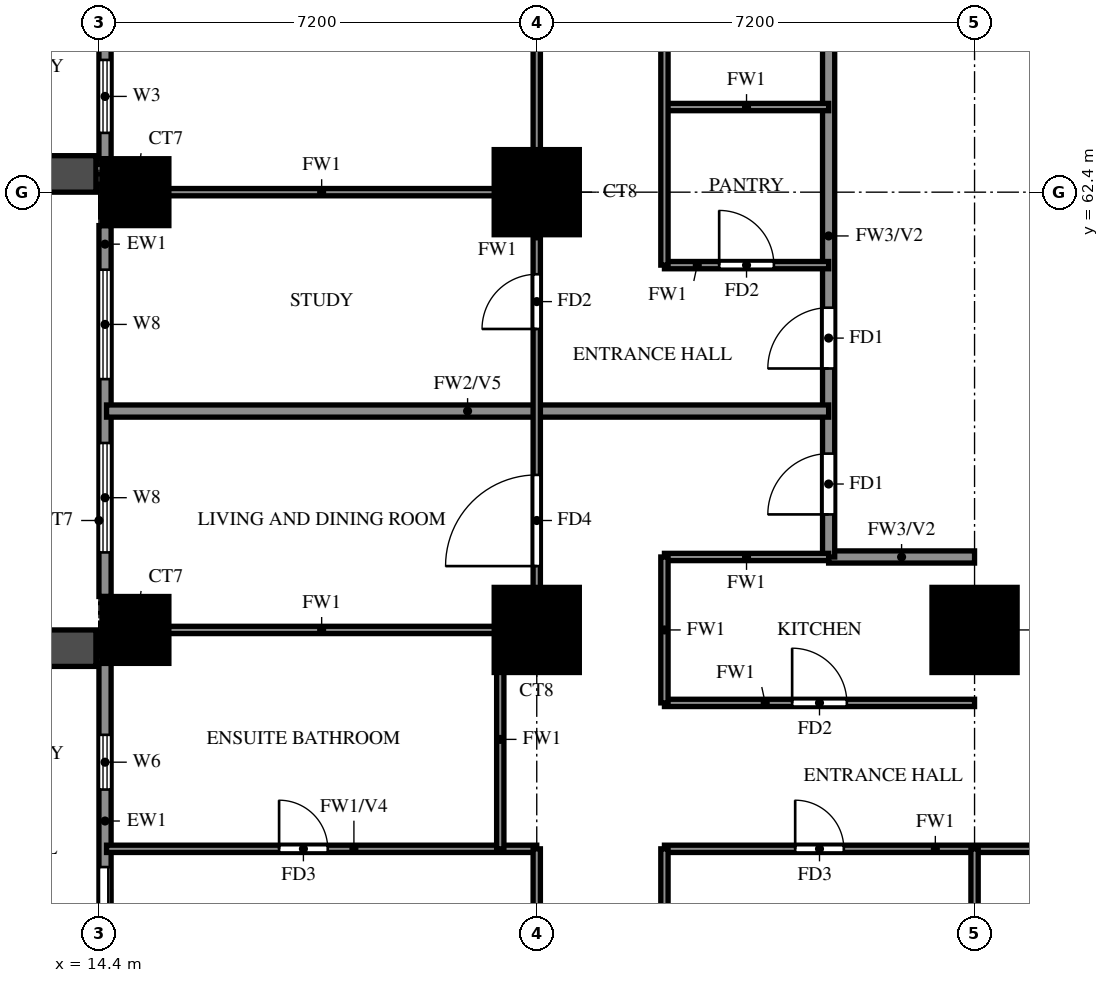
"""IFC4 building model, lengths in metres.
Left out: names, types, materials, properties, quantities, classifications, styles, units other than length and angle.
Written with IfcOpenShell. Run it as: python <this file> out.ifc"""

import sys

from ifc_helpers import new_model, si_unit, direction, frame, frame_2d, origin, origin_2d, place, context, subcontext, project, spatial, rectangle, extrude, source, transform, mapped, element, fill, save


model = new_model("IFC4")
c1 = context("Model", 3, precision=1e-05, world=origin(), true_north=direction((0.0, 1.0)))
c2 = subcontext(c1, "Body", "Model", "MODEL_VIEW")
j1 = project(units=[si_unit("LENGTHUNIT", "METRE"), si_unit("PLANEANGLEUNIT", "RADIAN")], contexts=[c1])
p1 = place(None, origin())
s1 = spatial("IfcSite", under=j1, at=p1, CompositionType="ELEMENT")
p2 = place(p1, origin())
s2 = spatial("IfcBuilding", under=s1, at=p2, CompositionType="ELEMENT")
p3 = place(p2, frame((0.0, 0.0, 58.5)))
s3 = spatial("IfcBuildingStorey", under=s2, at=p3, CompositionType="ELEMENT", Elevation=58.5)
m1 = source(origin(), c2, "Body", "SweptSolid", [
    extrude(rectangle(XDim=1.1, YDim=1.1, at=origin_2d()), origin(), (0.0, 0.0, 1.0), 3.18),
])
p4 = place(p3, frame((15.0, 55.2, 0.0), z_axis=(0.0, 0.0, 1.0), x_axis=(1.0, 0.0, 0.0)))
e1 = element("IfcColumn", 1, at=p4, inside=s3, PredefinedType="COLUMN", context=c2, shape_type="MappedRepresentation", body=[
    mapped(m1, transform((0.0, 0.0, 0.0))),
])
m2 = source(origin(), c2, "Body", "SweptSolid", [
    extrude(rectangle(XDim=1.4, YDim=1.4, at=origin_2d()), origin(), (0.0, 0.0, 1.0), 3.18),
])
for number, where, z_axis, x_axis in (
    (2, (21.6, 55.2, 0.0), (0.0, 0.0, 1.0), (1.0, 0.0, 0.0)),
    (3, (28.8, 55.2, 0.0), (0.0, 0.0, 1.0), (1.0, 0.0, 0.0)),
):
    element("IfcColumn", number, at=place(p3, frame(where, z_axis=z_axis, x_axis=x_axis)), inside=s3, PredefinedType="COLUMN", context=c2, shape_type="MappedRepresentation", body=[
        mapped(m2, transform((0.0, 0.0, 0.0))),
    ])
p5 = place(p3, frame((15.0, 62.4, 0.0), z_axis=(0.0, 0.0, 1.0), x_axis=(1.0, 0.0, 0.0)))
e4 = element("IfcColumn", 4, at=p5, inside=s3, PredefinedType="COLUMN", context=c2, shape_type="MappedRepresentation", body=[
    mapped(m1, transform((0.0, 0.0, 0.0))),
])
p6 = place(p3, frame((21.6, 62.4, 0.0), z_axis=(0.0, 0.0, 1.0), x_axis=(1.0, 0.0, 0.0)))
e5 = element("IfcColumn", 5, at=p6, inside=s3, PredefinedType="COLUMN", context=c2, shape_type="MappedRepresentation", body=[
    mapped(m2, transform((0.0, 0.0, 0.0))),
])
p7 = place(p3, frame((14.5, 69.05, 0.0), z_axis=(0.0, 0.0, 1.0), x_axis=(0.0, -1.0, 0.0)))
e6 = element("IfcWall", 6, at=p7, inside=s3, PredefinedType="SOLIDWALL", context=c2, shape_type="SweptSolid", body=[
    extrude(rectangle(XDim=6.1, YDim=0.2, at=frame_2d((3.05, 0.0))), origin(), (0.0, 0.0, 1.0), 3.18),
])
p8 = place(p7, frame((2.15, 0.0, 0.0)))
e7 = element("IfcOpeningElement", 7, at=p8, cuts=e6, PredefinedType="OPENING", context=c2, shape_type="SweptSolid", body=[
    extrude(rectangle(XDim=1.8, YDim=2.4, at=frame_2d((0.9, 1.2))), frame((0.0, 0.11, 0.0), z_axis=(0.0, -1.0, 0.0), x_axis=(1.0, 0.0, 0.0)), (0.0, 0.0, 1.0), 0.22),
])
p9 = place(p7, frame((0.425, 0.0, 0.6)))
e8 = element("IfcOpeningElement", 8, at=p9, cuts=e6, PredefinedType="OPENING", context=c2, shape_type="SweptSolid", body=[
    extrude(rectangle(XDim=1.2, YDim=2.4, at=frame_2d((0.6, 1.2))), frame((0.0, 0.11, 0.0), z_axis=(0.0, -1.0, 0.0), x_axis=(1.0, 0.0, 0.0)), (0.0, 0.0, 1.0), 0.22),
])
p10 = place(p7, frame((4.475, 0.0, 0.6)))
e9 = element("IfcOpeningElement", 9, at=p10, cuts=e6, PredefinedType="OPENING", context=c2, shape_type="SweptSolid", body=[
    extrude(rectangle(XDim=1.2, YDim=2.4, at=frame_2d((0.6, 1.2))), frame((0.0, 0.11, 0.0), z_axis=(0.0, -1.0, 0.0), x_axis=(1.0, 0.0, 0.0)), (0.0, 0.0, 1.0), 0.22),
])
p11 = place(p3, frame((14.5, 61.85, 0.0), z_axis=(0.0, 0.0, 1.0), x_axis=(0.0, -1.0, 0.0)))
e10 = element("IfcWall", 10, at=p11, inside=s3, PredefinedType="SOLIDWALL", context=c2, shape_type="SweptSolid", body=[
    extrude(rectangle(XDim=6.1, YDim=0.2, at=frame_2d((3.05, 0.0))), origin(), (0.0, 0.0, 1.0), 3.18),
])
p12 = place(p11, frame((3.575, 0.0, 0.6)))
e11 = element("IfcOpeningElement", 11, at=p12, cuts=e10, PredefinedType="OPENING", context=c2, shape_type="SweptSolid", body=[
    extrude(rectangle(XDim=1.8, YDim=2.4, at=frame_2d((0.9, 1.2))), frame((0.0, 0.11, 0.0), z_axis=(0.0, -1.0, 0.0), x_axis=(1.0, 0.0, 0.0)), (0.0, 0.0, 1.0), 0.22),
])
p13 = place(p11, frame((0.725, 0.0, 0.6)))
e12 = element("IfcOpeningElement", 12, at=p13, cuts=e10, PredefinedType="OPENING", context=c2, shape_type="SweptSolid", body=[
    extrude(rectangle(XDim=1.8, YDim=2.4, at=frame_2d((0.9, 1.2))), frame((0.0, 0.11, 0.0), z_axis=(0.0, -1.0, 0.0), x_axis=(1.0, 0.0, 0.0)), (0.0, 0.0, 1.0), 0.22),
])
p14 = place(p3, frame((14.5, 54.65, 0.0), z_axis=(0.0, 0.0, 1.0), x_axis=(0.0, -1.0, 0.0)))
e13 = element("IfcWall", 13, at=p14, inside=s3, PredefinedType="SOLIDWALL", context=c2, shape_type="SweptSolid", body=[
    extrude(rectangle(XDim=6.1, YDim=0.2, at=frame_2d((3.05, 0.0))), origin(), (0.0, 0.0, 1.0), 3.18),
])
p15 = place(p14, frame((3.35, 0.0, 0.0)))
e14 = element("IfcOpeningElement", 14, at=p15, cuts=e13, PredefinedType="OPENING", context=c2, shape_type="SweptSolid", body=[
    extrude(rectangle(XDim=1.8, YDim=2.4, at=frame_2d((0.9, 1.2))), frame((0.0, 0.11, 0.0), z_axis=(0.0, -1.0, 0.0), x_axis=(1.0, 0.0, 0.0)), (0.0, 0.0, 1.0), 0.22),
])
p16 = place(p14, frame((1.175, 0.0, 1.5)))
e15 = element("IfcOpeningElement", 15, at=p16, cuts=e13, PredefinedType="OPENING", context=c2, shape_type="SweptSolid", body=[
    extrude(rectangle(XDim=0.9, YDim=0.9, at=frame_2d((0.45, 0.45))), frame((0.0, 0.11, 0.0), z_axis=(0.0, -1.0, 0.0), x_axis=(1.0, 0.0, 0.0)), (0.0, 0.0, 1.0), 0.22),
])
for number, where, z_axis, x_axis in (
    (16, (14.35, 62.7, 0.0), (0.0, 0.0, 1.0), (-1.0, 0.0, 0.0)),
    (17, (14.35, 54.9, 0.0), (0.0, 0.0, 1.0), (-1.0, 0.0, 0.0)),
):
    element("IfcWall", number, at=place(p3, frame(where, z_axis=z_axis, x_axis=x_axis)), inside=s3, PredefinedType="SOLIDWALL", context=c2, shape_type="SweptSolid", body=[
        extrude(rectangle(XDim=2.65, YDim=0.6, at=frame_2d((1.325, 0.0))), origin(), (0.0, 0.0, 1.0), 2.85),
    ])
p17 = place(p3, frame((26.4, 56.4, 0.0), z_axis=(0.0, 0.0, 1.0), x_axis=(1.0, 0.0, 0.0)))
e18 = element("IfcWall", 18, at=p17, inside=s3, PredefinedType="SOLIDWALL", context=c2, shape_type="SweptSolid", body=[
    extrude(rectangle(XDim=2.4, YDim=0.2, at=frame_2d((1.2, 0.0))), origin(), (0.0, 0.0, 1.0), 3.18),
])
p18 = place(p3, frame((26.4, 56.4, 0.0), z_axis=(0.0, 0.0, 1.0), x_axis=(0.0, 1.0, 0.0)))
e19 = element("IfcWall", 19, at=p18, inside=s3, PredefinedType="SOLIDWALL", context=c2, shape_type="SweptSolid", body=[
    extrude(rectangle(XDim=9.6, YDim=0.2, at=frame_2d((4.8, 0.0))), origin(), (0.0, 0.0, 1.0), 3.18),
])
p19 = place(p18, frame((0.7, 0.0, 0.0)))
e20 = element("IfcOpeningElement", 20, at=p19, cuts=e19, PredefinedType="OPENING", context=c2, shape_type="SweptSolid", body=[
    extrude(rectangle(XDim=1.0, YDim=2.1, at=frame_2d((0.5, 1.05))), frame((0.0, 0.11, 0.0), z_axis=(0.0, -1.0, 0.0), x_axis=(1.0, 0.0, 0.0)), (0.0, 0.0, 1.0), 0.22),
])
p20 = place(p18, frame((3.1, 0.0, 0.0)))
e21 = element("IfcOpeningElement", 21, at=p20, cuts=e19, PredefinedType="OPENING", context=c2, shape_type="SweptSolid", body=[
    extrude(rectangle(XDim=1.0, YDim=2.1, at=frame_2d((0.5, 1.05))), frame((0.0, 0.11, 0.0), z_axis=(0.0, -1.0, 0.0), x_axis=(1.0, 0.0, 0.0)), (0.0, 0.0, 1.0), 0.22),
])
p21 = place(p3, frame((14.525, 58.8, 0.0), z_axis=(0.0, 0.0, 1.0), x_axis=(1.0, 0.0, 0.0)))
e22 = element("IfcWall", 22, at=p21, inside=s3, PredefinedType="SOLIDWALL", context=c2, shape_type="SweptSolid", body=[
    extrude(rectangle(XDim=11.875, YDim=0.2, at=frame_2d((5.938, 0.0))), origin(), (0.0, 0.0, 1.0), 2.28),
])
p22 = place(p3, frame((14.525, 51.6, 0.0), z_axis=(0.0, 0.0, 1.0), x_axis=(1.0, 0.0, 0.0)))
e23 = element("IfcWall", 23, at=p22, inside=s3, PredefinedType="PARTITIONING", context=c2, shape_type="SweptSolid", body=[
    extrude(rectangle(XDim=7.075, YDim=0.12, at=frame_2d((3.538, 0.0))), origin(), (0.0, 0.0, 1.0), 2.28),
])
p23 = place(p22, frame((2.837, 0.0, 0.0)))
e24 = element("IfcOpeningElement", 24, at=p23, cuts=e23, PredefinedType="OPENING", context=c2, shape_type="SweptSolid", body=[
    extrude(rectangle(XDim=0.8, YDim=2.1, at=frame_2d((0.4, 1.05))), frame((0.0, 0.07, 0.0), z_axis=(0.0, -1.0, 0.0), x_axis=(1.0, 0.0, 0.0)), (0.0, 0.0, 1.0), 0.14),
])
p24 = place(p3, frame((23.7, 51.6, 0.0), z_axis=(0.0, 0.0, 1.0), x_axis=(1.0, 0.0, 0.0)))
e25 = element("IfcWall", 25, at=p24, inside=s3, PredefinedType="PARTITIONING", context=c2, shape_type="SweptSolid", body=[
    extrude(rectangle(XDim=9.9, YDim=0.12, at=frame_2d((4.95, 0.0))), origin(), (0.0, 0.0, 1.0), 3.18),
])
p25 = place(p24, frame((2.15, 0.0, 0.0)))
e26 = element("IfcOpeningElement", 26, at=p25, cuts=e25, PredefinedType="OPENING", context=c2, shape_type="SweptSolid", body=[
    extrude(rectangle(XDim=0.8, YDim=2.1, at=frame_2d((0.4, 1.05))), frame((0.0, 0.07, 0.0), z_axis=(0.0, -1.0, 0.0), x_axis=(1.0, 0.0, 0.0)), (0.0, 0.0, 1.0), 0.14),
])
p26 = place(p24, frame((7.05, 0.0, 0.0)))
e27 = element("IfcOpeningElement", 27, at=p26, cuts=e25, PredefinedType="OPENING", context=c2, shape_type="SweptSolid", body=[
    extrude(rectangle(XDim=0.9, YDim=2.1, at=frame_2d((0.45, 1.05))), frame((0.0, 0.07, 0.0), z_axis=(0.0, -1.0, 0.0), x_axis=(1.0, 0.0, 0.0)), (0.0, 0.0, 1.0), 0.14),
])
p27 = place(p3, frame((23.7, 54.0, 0.0), z_axis=(0.0, 0.0, 1.0), x_axis=(1.0, 0.0, 0.0)))
e28 = element("IfcWall", 28, at=p27, inside=s3, PredefinedType="PARTITIONING", context=c2, shape_type="SweptSolid", body=[
    extrude(rectangle(XDim=5.1, YDim=0.12, at=frame_2d((2.55, 0.0))), origin(), (0.0, 0.0, 1.0), 3.18),
])
p28 = place(p27, frame((2.1, 0.0, 0.0)))
e29 = element("IfcOpeningElement", 29, at=p28, cuts=e28, PredefinedType="OPENING", context=c2, shape_type="SweptSolid", body=[
    extrude(rectangle(XDim=0.9, YDim=2.1, at=frame_2d((0.45, 1.05))), frame((0.0, 0.07, 0.0), z_axis=(0.0, -1.0, 0.0), x_axis=(1.0, 0.0, 0.0)), (0.0, 0.0, 1.0), 0.14),
])
p29 = place(p3, frame((14.525, 55.2, 0.0), z_axis=(0.0, 0.0, 1.0), x_axis=(1.0, 0.0, 0.0)))
e30 = element("IfcWall", 30, at=p29, inside=s3, PredefinedType="PARTITIONING", context=c2, shape_type="SweptSolid", body=[
    extrude(rectangle(XDim=7.075, YDim=0.12, at=frame_2d((3.538, 0.0))), origin(), (0.0, 0.0, 1.0), 3.18),
])
p30 = place(p3, frame((23.7, 56.4, 0.0), z_axis=(0.0, 0.0, 1.0), x_axis=(1.0, 0.0, 0.0)))
e31 = element("IfcWall", 31, at=p30, inside=s3, PredefinedType="PARTITIONING", context=c2, shape_type="SweptSolid", body=[
    extrude(rectangle(XDim=2.7, YDim=0.12, at=frame_2d((1.35, 0.0))), origin(), (0.0, 0.0, 1.0), 3.18),
])
p31 = place(p3, frame((23.7, 61.2, 0.0), z_axis=(0.0, 0.0, 1.0), x_axis=(1.0, 0.0, 0.0)))
e32 = element("IfcWall", 32, at=p31, inside=s3, PredefinedType="PARTITIONING", context=c2, shape_type="SweptSolid", body=[
    extrude(rectangle(XDim=2.7, YDim=0.12, at=frame_2d((1.35, 0.0))), origin(), (0.0, 0.0, 1.0), 3.18),
])
p32 = place(p31, frame((0.9, 0.0, 0.0)))
e33 = element("IfcOpeningElement", 33, at=p32, cuts=e32, PredefinedType="OPENING", context=c2, shape_type="SweptSolid", body=[
    extrude(rectangle(XDim=0.9, YDim=2.1, at=frame_2d((0.45, 1.05))), frame((0.0, 0.07, 0.0), z_axis=(0.0, -1.0, 0.0), x_axis=(1.0, 0.0, 0.0)), (0.0, 0.0, 1.0), 0.14),
])
p33 = place(p3, frame((14.525, 62.4, 0.0), z_axis=(0.0, 0.0, 1.0), x_axis=(1.0, 0.0, 0.0)))
e34 = element("IfcWall", 34, at=p33, inside=s3, PredefinedType="PARTITIONING", context=c2, shape_type="SweptSolid", body=[
    extrude(rectangle(XDim=7.075, YDim=0.12, at=frame_2d((3.538, 0.0))), origin(), (0.0, 0.0, 1.0), 3.18),
])
p34 = place(p3, frame((23.7, 63.8, 0.0), z_axis=(0.0, 0.0, 1.0), x_axis=(1.0, 0.0, 0.0)))
e35 = element("IfcWall", 35, at=p34, inside=s3, PredefinedType="PARTITIONING", context=c2, shape_type="SweptSolid", body=[
    extrude(rectangle(XDim=2.7, YDim=0.12, at=frame_2d((1.35, 0.0))), origin(), (0.0, 0.0, 1.0), 3.18),
])
p35 = place(p3, frame((21.0, 51.6, 0.0), z_axis=(0.0, 0.0, 1.0), x_axis=(0.0, 1.0, 0.0)))
e36 = element("IfcWall", 36, at=p35, inside=s3, PredefinedType="PARTITIONING", context=c2, shape_type="SweptSolid", body=[
    extrude(rectangle(XDim=3.6, YDim=0.12, at=frame_2d((1.8, 0.0))), origin(), (0.0, 0.0, 1.0), 3.18),
])
p36 = place(p3, frame((21.6, 33.725, 0.0), z_axis=(0.0, 0.0, 1.0), x_axis=(0.0, 1.0, 0.0)))
e37 = element("IfcWall", 37, at=p36, inside=s3, PredefinedType="PARTITIONING", context=c2, shape_type="SweptSolid", body=[
    extrude(rectangle(XDim=17.875, YDim=0.12, at=frame_2d((8.938, 0.0))), origin(), (0.0, 0.0, 1.0), 3.18),
])
p37 = place(p36, frame((7.775, 0.0, 0.0)))
e38 = element("IfcOpeningElement", 38, at=p37, cuts=e37, PredefinedType="OPENING", context=c2, shape_type="SweptSolid", body=[
    extrude(rectangle(XDim=0.9, YDim=2.1, at=frame_2d((0.45, 1.05))), frame((0.0, 0.07, 0.0), z_axis=(0.0, -1.0, 0.0), x_axis=(1.0, 0.0, 0.0)), (0.0, 0.0, 1.0), 0.14),
])
p38 = place(p36, frame((15.625, 0.0, 0.0)))
e39 = element("IfcOpeningElement", 39, at=p38, cuts=e37, PredefinedType="OPENING", context=c2, shape_type="SweptSolid", body=[
    extrude(rectangle(XDim=0.9, YDim=2.1, at=frame_2d((0.45, 1.05))), frame((0.0, 0.07, 0.0), z_axis=(0.0, -1.0, 0.0), x_axis=(1.0, 0.0, 0.0)), (0.0, 0.0, 1.0), 0.14),
])
p39 = place(p3, frame((21.6, 55.2, 0.0), z_axis=(0.0, 0.0, 1.0), x_axis=(0.0, 1.0, 0.0)))
e40 = element("IfcWall", 40, at=p39, inside=s3, PredefinedType="PARTITIONING", context=c2, shape_type="SweptSolid", body=[
    extrude(rectangle(XDim=14.4, YDim=0.12, at=frame_2d((7.2, 0.0))), origin(), (0.0, 0.0, 1.0), 3.18),
])
p40 = place(p39, frame((1.05, 0.0, 0.0)))
e41 = element("IfcOpeningElement", 41, at=p40, cuts=e40, PredefinedType="OPENING", context=c2, shape_type="SweptSolid", body=[
    extrude(rectangle(XDim=1.5, YDim=2.1, at=frame_2d((0.75, 1.05))), frame((0.0, 0.07, 0.0), z_axis=(0.0, -1.0, 0.0), x_axis=(1.0, 0.0, 0.0)), (0.0, 0.0, 1.0), 0.14),
])
p41 = place(p39, frame((4.95, 0.0, 0.0)))
e42 = element("IfcOpeningElement", 42, at=p41, cuts=e40, PredefinedType="OPENING", context=c2, shape_type="SweptSolid", body=[
    extrude(rectangle(XDim=0.9, YDim=2.1, at=frame_2d((0.45, 1.05))), frame((0.0, 0.07, 0.0), z_axis=(0.0, -1.0, 0.0), x_axis=(1.0, 0.0, 0.0)), (0.0, 0.0, 1.0), 0.14),
])
p42 = place(p39, frame((10.35, 0.0, 0.0)))
e43 = element("IfcOpeningElement", 43, at=p42, cuts=e40, PredefinedType="OPENING", context=c2, shape_type="SweptSolid", body=[
    extrude(rectangle(XDim=0.9, YDim=2.1, at=frame_2d((0.45, 1.05))), frame((0.0, 0.07, 0.0), z_axis=(0.0, -1.0, 0.0), x_axis=(1.0, 0.0, 0.0)), (0.0, 0.0, 1.0), 0.14),
])
p43 = place(p3, frame((23.7, 48.0, 0.0), z_axis=(0.0, 0.0, 1.0), x_axis=(0.0, 1.0, 0.0)))
e44 = element("IfcWall", 44, at=p43, inside=s3, PredefinedType="PARTITIONING", context=c2, shape_type="SweptSolid", body=[
    extrude(rectangle(XDim=3.6, YDim=0.12, at=frame_2d((1.8, 0.0))), origin(), (0.0, 0.0, 1.0), 3.18),
])
p44 = place(p3, frame((23.7, 54.0, 0.0), z_axis=(0.0, 0.0, 1.0), x_axis=(0.0, 1.0, 0.0)))
e45 = element("IfcWall", 45, at=p44, inside=s3, PredefinedType="PARTITIONING", context=c2, shape_type="SweptSolid", body=[
    extrude(rectangle(XDim=2.4, YDim=0.12, at=frame_2d((1.2, 0.0))), origin(), (0.0, 0.0, 1.0), 3.18),
])
p45 = place(p3, frame((23.7, 61.2, 0.0), z_axis=(0.0, 0.0, 1.0), x_axis=(0.0, 1.0, 0.0)))
e46 = element("IfcWall", 46, at=p45, inside=s3, PredefinedType="PARTITIONING", context=c2, shape_type="SweptSolid", body=[
    extrude(rectangle(XDim=12.0, YDim=0.12, at=frame_2d((6.0, 0.0))), origin(), (0.0, 0.0, 1.0), 3.18),
])
p46 = place(p45, frame((4.55, 0.0, 0.0)))
e47 = element("IfcOpeningElement", 47, at=p46, cuts=e46, PredefinedType="OPENING", context=c2, shape_type="SweptSolid", body=[
    extrude(rectangle(XDim=0.9, YDim=2.1, at=frame_2d((0.45, 1.05))), frame((0.0, 0.07, 0.0), z_axis=(0.0, -1.0, 0.0), x_axis=(1.0, 0.0, 0.0)), (0.0, 0.0, 1.0), 0.14),
])
p47 = place(p45, frame((9.3, 0.0, 0.0)))
e48 = element("IfcOpeningElement", 48, at=p47, cuts=e46, PredefinedType="OPENING", context=c2, shape_type="SweptSolid", body=[
    extrude(rectangle(XDim=0.8, YDim=2.1, at=frame_2d((0.4, 1.05))), frame((0.0, 0.07, 0.0), z_axis=(0.0, -1.0, 0.0), x_axis=(1.0, 0.0, 0.0)), (0.0, 0.0, 1.0), 0.14),
])
p48 = place(p3, frame((28.8, 48.0, 0.0), z_axis=(0.0, 0.0, 1.0), x_axis=(0.0, 1.0, 0.0)))
e49 = element("IfcWall", 49, at=p48, inside=s3, PredefinedType="PARTITIONING", context=c2, shape_type="SweptSolid", body=[
    extrude(rectangle(XDim=3.6, YDim=0.12, at=frame_2d((1.8, 0.0))), origin(), (0.0, 0.0, 1.0), 3.18),
])
p49 = place(p10, origin())
e50 = element("IfcWindow", 50, at=p49, inside=s3, PartitioningType="SINGLE_PANEL", PredefinedType="WINDOW", context=c2, shape_type="SweptSolid", body=[
    extrude(rectangle(XDim=1.2, YDim=2.4, at=frame_2d((0.6, 1.2))), frame((0.0, 0.03, 0.0), z_axis=(0.0, -1.0, 0.0), x_axis=(1.0, 0.0, 0.0)), (0.0, 0.0, 1.0), 0.06),
])
fill(e9, e50)
p50 = place(p12, origin())
e51 = element("IfcWindow", 51, at=p50, inside=s3, PartitioningType="DOUBLE_PANEL_VERTICAL", PredefinedType="WINDOW", context=c2, shape_type="SweptSolid", body=[
    extrude(rectangle(XDim=1.8, YDim=2.4, at=frame_2d((0.9, 1.2))), frame((0.0, 0.03, 0.0), z_axis=(0.0, -1.0, 0.0), x_axis=(1.0, 0.0, 0.0)), (0.0, 0.0, 1.0), 0.06),
])
fill(e11, e51)
p51 = place(p13, origin())
e52 = element("IfcWindow", 52, at=p51, inside=s3, PartitioningType="DOUBLE_PANEL_VERTICAL", PredefinedType="WINDOW", context=c2, shape_type="SweptSolid", body=[
    extrude(rectangle(XDim=1.8, YDim=2.4, at=frame_2d((0.9, 1.2))), frame((0.0, 0.03, 0.0), z_axis=(0.0, -1.0, 0.0), x_axis=(1.0, 0.0, 0.0)), (0.0, 0.0, 1.0), 0.06),
])
fill(e12, e52)
p52 = place(p15, origin())
e53 = element("IfcDoor", 53, at=p52, inside=s3, OperationType="DOUBLE_DOOR_SLIDING", PredefinedType="DOOR", context=c2, shape_type="SweptSolid", body=[
    extrude(rectangle(XDim=1.8, YDim=2.4, at=frame_2d((0.9, 1.2))), frame((0.0, 0.025, 0.0), z_axis=(0.0, -1.0, 0.0), x_axis=(1.0, 0.0, 0.0)), (0.0, 0.0, 1.0), 0.05),
])
fill(e14, e53)
p53 = place(p16, origin())
e54 = element("IfcWindow", 54, at=p53, inside=s3, PartitioningType="SINGLE_PANEL", PredefinedType="WINDOW", context=c2, shape_type="SweptSolid", body=[
    extrude(rectangle(XDim=0.9, YDim=0.9, at=frame_2d((0.45, 0.45))), frame((0.0, 0.03, 0.0), z_axis=(0.0, -1.0, 0.0), x_axis=(1.0, 0.0, 0.0)), (0.0, 0.0, 1.0), 0.06),
])
fill(e15, e54)
p54 = place(p19, origin())
e55 = element("IfcDoor", 55, at=p54, inside=s3, OperationType="SINGLE_SWING_RIGHT", PredefinedType="DOOR", context=c2, shape_type="SweptSolid", body=[
    extrude(rectangle(XDim=1.0, YDim=2.1, at=frame_2d((0.5, 1.05))), frame((0.0, 0.025, 0.0), z_axis=(0.0, -1.0, 0.0), x_axis=(1.0, 0.0, 0.0)), (0.0, 0.0, 1.0), 0.05),
])
fill(e20, e55)
p55 = place(p23, origin())
e56 = element("IfcDoor", 56, at=p55, inside=s3, OperationType="SINGLE_SWING_LEFT", PredefinedType="DOOR", context=c2, shape_type="SweptSolid", body=[
    extrude(rectangle(XDim=0.8, YDim=2.1, at=frame_2d((0.4, 1.05))), frame((0.0, 0.025, 0.0), z_axis=(0.0, -1.0, 0.0), x_axis=(1.0, 0.0, 0.0)), (0.0, 0.0, 1.0), 0.05),
])
fill(e24, e56)
p56 = place(p40, origin())
e57 = element("IfcDoor", 57, at=p56, inside=s3, OperationType="SINGLE_SWING_RIGHT", PredefinedType="DOOR", context=c2, shape_type="SweptSolid", body=[
    extrude(rectangle(XDim=1.5, YDim=2.1, at=frame_2d((0.75, 1.05))), frame((0.0, 0.025, 0.0), z_axis=(0.0, -1.0, 0.0), x_axis=(1.0, 0.0, 0.0)), (0.0, 0.0, 1.0), 0.05),
])
fill(e41, e57)
p57 = place(p25, origin())
e58 = element("IfcDoor", 58, at=p57, inside=s3, OperationType="SINGLE_SWING_LEFT", PredefinedType="DOOR", context=c2, shape_type="SweptSolid", body=[
    extrude(rectangle(XDim=0.8, YDim=2.1, at=frame_2d((0.4, 1.05))), frame((0.0, 0.025, 0.0), z_axis=(0.0, -1.0, 0.0), x_axis=(1.0, 0.0, 0.0)), (0.0, 0.0, 1.0), 0.05),
])
fill(e26, e58)
p58 = place(p28, origin())
e59 = element("IfcDoor", 59, at=p58, inside=s3, OperationType="SINGLE_SWING_LEFT", PredefinedType="DOOR", context=c2, shape_type="SweptSolid", body=[
    extrude(rectangle(XDim=0.9, YDim=2.1, at=frame_2d((0.45, 1.05))), frame((0.0, 0.025, 0.0), z_axis=(0.0, -1.0, 0.0), x_axis=(1.0, 0.0, 0.0)), (0.0, 0.0, 1.0), 0.05),
])
fill(e29, e59)
p59 = place(p20, origin())
e60 = element("IfcDoor", 60, at=p59, inside=s3, OperationType="SINGLE_SWING_LEFT", PredefinedType="DOOR", context=c2, shape_type="SweptSolid", body=[
    extrude(rectangle(XDim=1.0, YDim=2.1, at=frame_2d((0.5, 1.05))), frame((0.0, 0.025, 0.0), z_axis=(0.0, -1.0, 0.0), x_axis=(1.0, 0.0, 0.0)), (0.0, 0.0, 1.0), 0.05),
])
fill(e21, e60)
p60 = place(p41, origin())
e61 = element("IfcDoor", 61, at=p60, inside=s3, OperationType="SINGLE_SWING_RIGHT", PredefinedType="DOOR", context=c2, shape_type="SweptSolid", body=[
    extrude(rectangle(XDim=0.9, YDim=2.1, at=frame_2d((0.45, 1.05))), frame((0.0, 0.025, 0.0), z_axis=(0.0, -1.0, 0.0), x_axis=(1.0, 0.0, 0.0)), (0.0, 0.0, 1.0), 0.05),
])
fill(e42, e61)
p61 = place(p32, origin())
e62 = element("IfcDoor", 62, at=p61, inside=s3, OperationType="SINGLE_SWING_LEFT", PredefinedType="DOOR", context=c2, shape_type="SweptSolid", body=[
    extrude(rectangle(XDim=0.9, YDim=2.1, at=frame_2d((0.45, 1.05))), frame((0.0, 0.025, 0.0), z_axis=(0.0, -1.0, 0.0), x_axis=(1.0, 0.0, 0.0)), (0.0, 0.0, 1.0), 0.05),
])
fill(e33, e62)
save(model, sys.argv[1])
